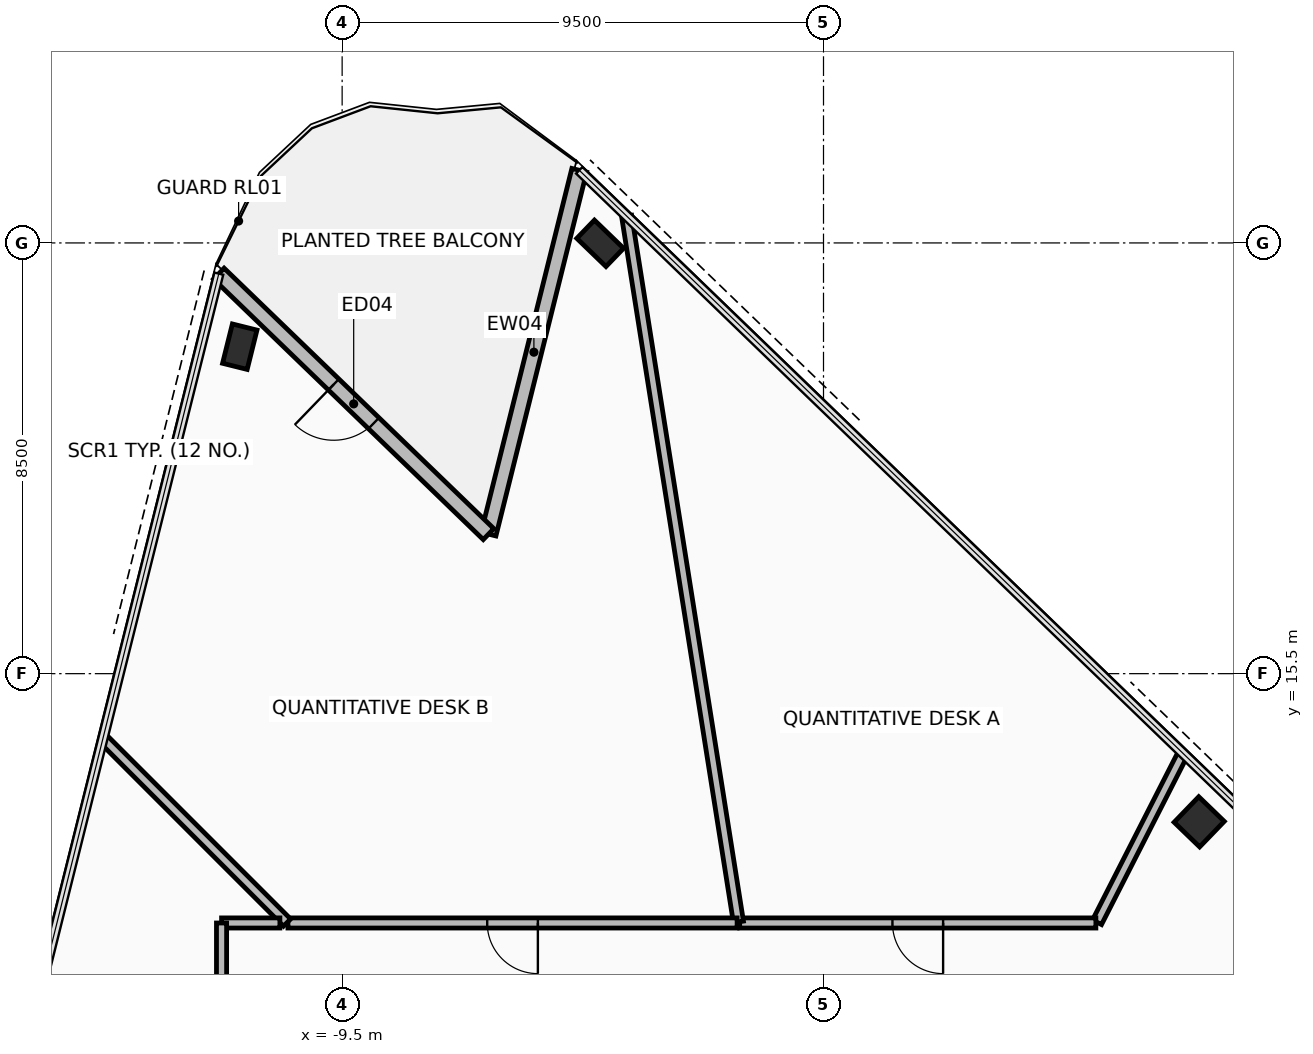
"""IFC4 building model, lengths in metres.
Left out: names, types, materials, properties, quantities, classifications, styles, units other than length and angle.
Written with IfcOpenShell. Run it as: python <this file> out.ifc"""

import sys

from ifc_helpers import new_model, si_unit, direction, frame, frame_2d, origin, origin_2d, place, context, subcontext, project, spatial, rectangle, hollow_rectangle, extrude, element, fill, save


model = new_model("IFC4")
c1 = context("Model", 3, precision=1e-05, world=origin(), true_north=direction((0.0, 1.0)))
c2 = subcontext(c1, "Body", "Model", "MODEL_VIEW")
j1 = project(units=[si_unit("LENGTHUNIT", "METRE"), si_unit("PLANEANGLEUNIT", "RADIAN")], contexts=[c1])
p1 = place(None, origin())
s1 = spatial("IfcSite", under=j1, at=p1, CompositionType="ELEMENT")
p2 = place(p1, origin())
s2 = spatial("IfcBuilding", under=s1, at=p2, CompositionType="ELEMENT")
p3 = place(p2, frame((0.0, 0.0, 107.7)))
s3 = spatial("IfcBuildingStorey", under=s2, at=p3, CompositionType="ELEMENT", Elevation=107.7)
p4 = place(p3, frame((-11.52, 21.952, 0.0), z_axis=(0.0, 0.0, 1.0), x_axis=(0.2419218956, 0.970295726276, 0.0)))
e1 = element("IfcColumn", 1, at=p4, inside=s3, PredefinedType="COLUMN", context=c2, shape_type="SweptSolid", body=[
    extrude(hollow_rectangle(XDim=0.5, YDim=0.8, WallThickness=0.04, at=origin_2d()), origin(), (0.0, 0.0, 1.0), 4.75),
])
p5 = place(p3, frame((7.415, 12.576, 0.0), z_axis=(0.0, 0.0, 1.0), x_axis=(-0.719339800339, 0.694658370459, 0.0)))
e2 = element("IfcColumn", 2, at=p5, inside=s3, PredefinedType="COLUMN", context=c2, shape_type="SweptSolid", body=[
    extrude(hollow_rectangle(XDim=0.7, YDim=0.7, WallThickness=0.04, at=origin_2d()), origin(), (0.0, 0.0, 1.0), 4.75),
])
p6 = place(p3, frame((-4.407, 23.992, 0.0), z_axis=(0.0, 0.0, 1.0), x_axis=(-0.719339800339, 0.694658370459, 0.0)))
e3 = element("IfcColumn", 3, at=p6, inside=s3, PredefinedType="COLUMN", context=c2, shape_type="SweptSolid", body=[
    extrude(hollow_rectangle(XDim=0.5, YDim=0.8, WallThickness=0.04, at=origin_2d()), origin(), (0.0, 0.0, 1.0), 4.75),
])
p7 = place(p3, frame((-4.82, 25.434, 0.0), z_axis=(0.0, 0.0, 1.0), x_axis=(-0.241930078207, -0.970293686086, 0.0)))
e4 = element("IfcWall", 4, at=p7, inside=s3, PredefinedType="STANDARD", context=c2, shape_type="SweptSolid", body=[
    extrude(rectangle(XDim=7.4, YDim=0.3, at=frame_2d((3.7, 0.0))), origin(), (0.0, 0.0, 1.0), 2.255),
])
p8 = place(p3, frame((-6.611, 18.254, 0.0), z_axis=(0.0, 0.0, 1.0), x_axis=(-0.719321869339, 0.694676938073, 0.0)))
e5 = element("IfcWall", 5, at=p8, inside=s3, PredefinedType="STANDARD", context=c2, shape_type="SweptSolid", body=[
    extrude(rectangle(XDim=7.4, YDim=0.3, at=frame_2d((3.7, 0.0))), origin(), (0.0, 0.0, 1.0), 2.255),
])
p9 = place(p8, frame((3.15, 0.0, 0.0)))
e6 = element("IfcOpeningElement", 6, at=p9, cuts=e5, PredefinedType="OPENING", context=c2, shape_type="SweptSolid", body=[
    extrude(rectangle(XDim=1.1, YDim=2.2, at=frame_2d((0.55, 1.1))), frame((0.0, 0.16, 0.0), z_axis=(0.0, -1.0, 0.0), x_axis=(1.0, 0.0, 0.0)), (0.0, 0.0, 1.0), 0.32),
])
p10 = place(p3, frame((7.087, 13.91, 0.0), z_axis=(0.0, 0.0, 1.0), x_axis=(-0.453996531255, -0.891003450952, 0.0)))
e7 = element("IfcWall", 7, at=p10, inside=s3, PredefinedType="PARTITIONING", context=c2, shape_type="SweptSolid", body=[
    extrude(rectangle(XDim=3.722, YDim=0.2, at=frame_2d((1.861, 0.0))), origin(), (0.0, 0.0, 1.0), 2.255),
])
p11 = place(p3, frame((5.375, 10.58, 0.0), z_axis=(0.0, 0.0, 1.0), x_axis=(-1.0, 0.0, 0.0)))
e8 = element("IfcWall", 8, at=p11, inside=s3, PredefinedType="PARTITIONING", context=c2, shape_type="SweptSolid", body=[
    extrude(rectangle(XDim=7.03, YDim=0.2, at=frame_2d((3.515, 0.0))), origin(), (0.0, 0.0, 1.0), 2.355),
])
p12 = place(p11, frame((3.015, 0.0, 0.0)))
e9 = element("IfcOpeningElement", 9, at=p12, cuts=e8, PredefinedType="OPENING", context=c2, shape_type="SweptSolid", body=[
    extrude(rectangle(XDim=1.0, YDim=2.15, at=frame_2d((0.5, 1.075))), frame((0.0, 0.11, 0.0), z_axis=(0.0, -1.0, 0.0), x_axis=(1.0, 0.0, 0.0)), (0.0, 0.0, 1.0), 0.22),
])
p13 = place(p3, frame((-1.679, 10.601, 0.0), z_axis=(0.0, 0.0, 1.0), x_axis=(-0.156435461173, 0.987688182823, 0.0)))
e10 = element("IfcWall", 10, at=p13, inside=s3, PredefinedType="PARTITIONING", context=c2, shape_type="SweptSolid", body=[
    extrude(rectangle(XDim=14.104, YDim=0.2, at=frame_2d((7.052, 0.0))), origin(), (0.0, 0.0, 1.0), 2.255),
])
p14 = place(p3, frame((-1.705, 10.58, 0.0), z_axis=(0.0, 0.0, 1.0), x_axis=(-1.0, 0.0, 0.0)))
e11 = element("IfcWall", 11, at=p14, inside=s3, PredefinedType="PARTITIONING", context=c2, shape_type="SweptSolid", body=[
    extrude(rectangle(XDim=8.865, YDim=0.2, at=frame_2d((4.432, 0.0))), origin(), (0.0, 0.0, 1.0), 2.355),
])
p15 = place(p14, frame((3.932, 0.0, 0.0)))
e12 = element("IfcOpeningElement", 12, at=p15, cuts=e11, PredefinedType="OPENING", context=c2, shape_type="SweptSolid", body=[
    extrude(rectangle(XDim=1.0, YDim=2.15, at=frame_2d((0.5, 1.075))), frame((0.0, 0.11, 0.0), z_axis=(0.0, -1.0, 0.0), x_axis=(1.0, 0.0, 0.0)), (0.0, 0.0, 1.0), 0.22),
])
p16 = place(p3, frame((-10.587, 10.587, 0.0), z_axis=(0.0, 0.0, 1.0), x_axis=(-0.707106781187, 0.707106781187, 0.0)))
e13 = element("IfcWall", 13, at=p16, inside=s3, PredefinedType="PARTITIONING", context=c2, shape_type="SweptSolid", body=[
    extrude(rectangle(XDim=5.125, YDim=0.2, at=frame_2d((2.562, 0.0))), origin(), (0.0, 0.0, 1.0), 2.255),
])
p17 = place(p3, frame((-10.729, 10.58, 0.0), z_axis=(0.0, 0.0, 1.0), x_axis=(-1.0, 0.0, 0.0)))
e14 = element("IfcWall", 14, at=p17, inside=s3, PredefinedType="PARTITIONING", context=c2, shape_type="SweptSolid", body=[
    extrude(rectangle(XDim=1.151, YDim=0.2, at=frame_2d((0.575, 0.0))), origin(), (0.0, 0.0, 1.0), 4.195),
])
p18 = place(p3, frame((-11.88, 10.579, 0.0), z_axis=(0.0, 0.0, 1.0), x_axis=(0.0, -1.0, 0.0)))
e15 = element("IfcWall", 15, at=p18, inside=s3, PredefinedType="PARTITIONING", context=c2, shape_type="SweptSolid", body=[
    extrude(rectangle(XDim=8.668, YDim=0.2, at=frame_2d((4.334, 0.0))), origin(), (0.0, 0.0, 1.0), 2.755),
])
p19 = place(p18, frame((3.834, 0.0, 0.0)))
e16 = element("IfcOpeningElement", 16, at=p19, cuts=e15, PredefinedType="OPENING", context=c2, shape_type="SweptSolid", body=[
    extrude(rectangle(XDim=1.0, YDim=2.15, at=frame_2d((0.5, 1.075))), frame((0.0, 0.11, 0.0), z_axis=(0.0, -1.0, 0.0), x_axis=(1.0, 0.0, 0.0)), (0.0, 0.0, 1.0), 0.22),
])
p20 = place(p9, frame((1.1, 0.0, 0.0), z_axis=(0.0, 0.0, 1.0), x_axis=(-1.0, 0.0, 0.0)))
e17 = element("IfcDoor", 17, at=p20, inside=s3, OperationType="SINGLE_SWING_LEFT", PredefinedType="DOOR", context=c2, shape_type="SweptSolid", body=[
    extrude(rectangle(XDim=1.1, YDim=2.2, at=frame_2d((0.55, 1.1))), frame((0.0, 0.025, 0.0), z_axis=(0.0, -1.0, 0.0), x_axis=(1.0, 0.0, 0.0)), (0.0, 0.0, 1.0), 0.05),
])
fill(e6, e17)
p21 = place(p12, origin())
e18 = element("IfcDoor", 18, at=p21, inside=s3, OperationType="SINGLE_SWING_RIGHT", PredefinedType="DOOR", context=c2, shape_type="SweptSolid", body=[
    extrude(rectangle(XDim=1.0, YDim=2.15, at=frame_2d((0.5, 1.075))), frame((0.0, 0.025, 0.0), z_axis=(0.0, -1.0, 0.0), x_axis=(1.0, 0.0, 0.0)), (0.0, 0.0, 1.0), 0.05),
])
fill(e9, e18)
p22 = place(p15, origin())
e19 = element("IfcDoor", 19, at=p22, inside=s3, OperationType="SINGLE_SWING_RIGHT", PredefinedType="DOOR", context=c2, shape_type="SweptSolid", body=[
    extrude(rectangle(XDim=1.0, YDim=2.15, at=frame_2d((0.5, 1.075))), frame((0.0, 0.025, 0.0), z_axis=(0.0, -1.0, 0.0), x_axis=(1.0, 0.0, 0.0)), (0.0, 0.0, 1.0), 0.05),
])
fill(e12, e19)
save(model, sys.argv[1])
